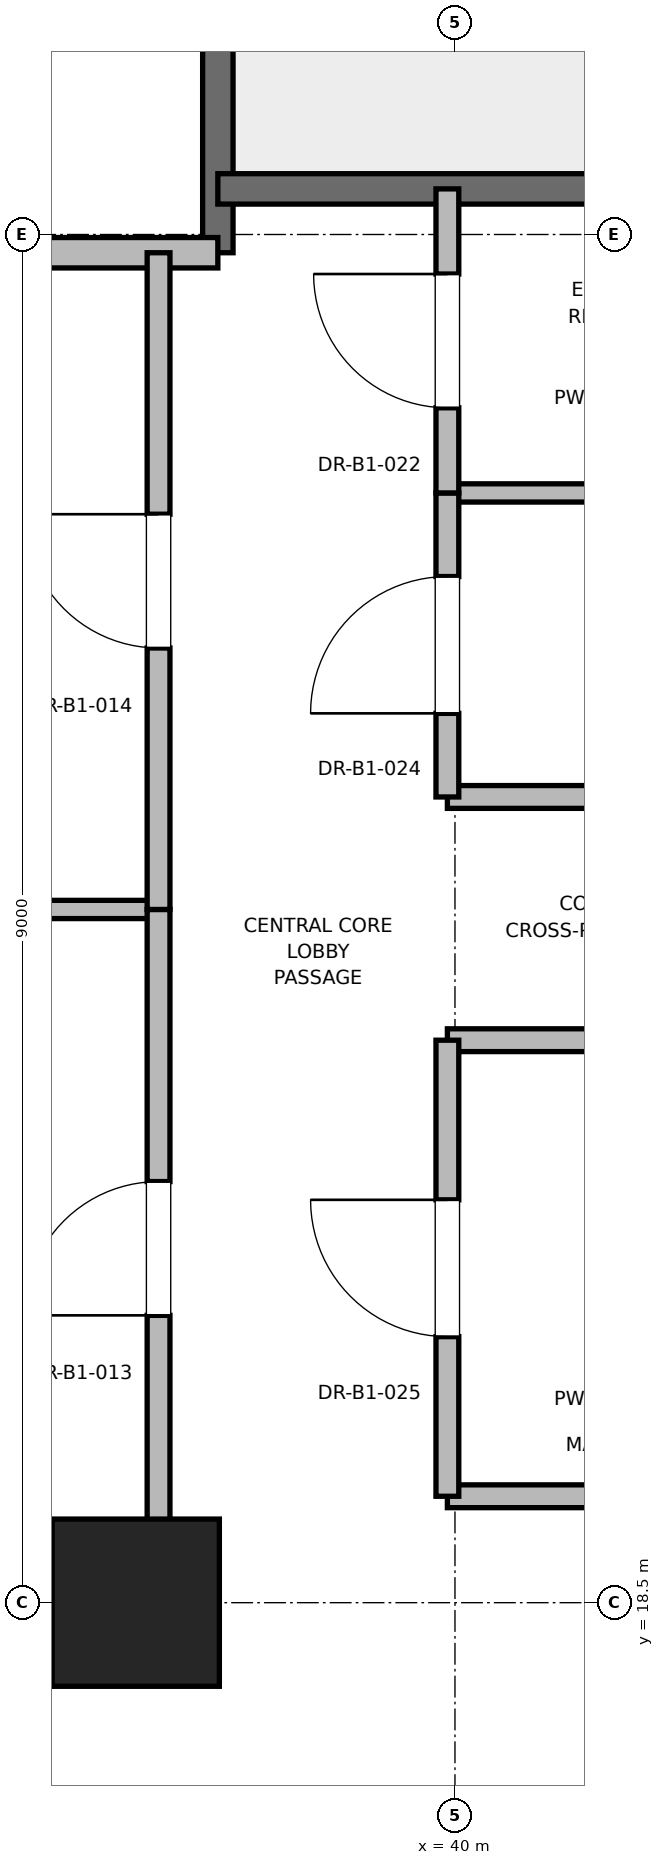
"""IFC4 building model, lengths in metres.
Left out: names, types, materials, properties, quantities, classifications, styles, units other than length and angle.
Written with IfcOpenShell. Run it as: python <this file> out.ifc"""

import sys

from ifc_helpers import new_model, si_unit, direction, frame, frame_2d, origin, origin_2d, place, context, subcontext, project, spatial, rectangle, extrude, element, fill, save


model = new_model("IFC4")
c1 = context("Model", 3, precision=1e-05, world=origin(), true_north=direction((0.0, 1.0)))
c2 = subcontext(c1, "Body", "Model", "MODEL_VIEW")
j1 = project(units=[si_unit("LENGTHUNIT", "METRE"), si_unit("PLANEANGLEUNIT", "RADIAN")], contexts=[c1])
p1 = place(None, origin())
s1 = spatial("IfcSite", under=j1, at=p1, CompositionType="ELEMENT")
p2 = place(p1, origin())
s2 = spatial("IfcBuilding", under=s1, at=p2, CompositionType="ELEMENT")
p3 = place(p2, frame((0.0, 0.0, -4.5)))
s3 = spatial("IfcBuildingStorey", under=s2, at=p3, CompositionType="ELEMENT", Elevation=-4.5)
p4 = place(p3, frame((37.9, 18.5, 0.0), z_axis=(0.0, 0.0, 1.0), x_axis=(1.0, 0.0, 0.0)))
e1 = element("IfcColumn", 1, at=p4, inside=s3, PredefinedType="PILASTER", context=c2, shape_type="SweptSolid", body=[
    extrude(rectangle(XDim=1.1, YDim=1.1, at=origin_2d()), origin(), (0.0, 0.0, 1.0), 4.5),
])
p5 = place(p3, frame((29.0, 18.5, 0.0), z_axis=(0.0, 0.0, 1.0), x_axis=(1.0, 0.0, 0.0)))
e2 = element("IfcWall", 2, at=p5, inside=s3, PredefinedType="SHEAR", context=c2, shape_type="SweptSolid", body=[
    extrude(rectangle(XDim=9.2, YDim=0.65, at=frame_2d((4.6, 0.0))), origin(), (0.0, 0.0, 1.0), 4.22),
])
p6 = place(p3, frame((38.44, 27.38, 0.0), z_axis=(0.0, 0.0, 1.0), x_axis=(0.0, 1.0, 0.0)))
e3 = element("IfcWall", 3, at=p6, inside=s3, PredefinedType="SOLIDWALL", context=c2, shape_type="SweptSolid", body=[
    extrude(rectangle(XDim=8.87, YDim=0.2, at=frame_2d((4.435, 0.0))), origin(), (0.0, 0.0, 1.0), 4.22),
])
p7 = place(p3, frame((38.44, 27.8, 0.0), z_axis=(0.0, 0.0, 1.0), x_axis=(1.0, 0.0, 0.0)))
e4 = element("IfcWall", 4, at=p7, inside=s3, PredefinedType="SOLIDWALL", context=c2, shape_type="SweptSolid", body=[
    extrude(rectangle(XDim=3.32, YDim=0.2, at=frame_2d((1.66, 0.0))), origin(), (0.0, 0.0, 1.0), 4.22),
])
p8 = place(p3, frame((32.82, 27.38, 0.0), z_axis=(0.0, 0.0, 1.0), x_axis=(1.0, 0.0, 0.0)))
e5 = element("IfcWall", 5, at=p8, inside=s3, PredefinedType="PARTITIONING", context=c2, shape_type="SweptSolid", body=[
    extrude(rectangle(XDim=5.62, YDim=0.2, at=frame_2d((2.81, 0.0))), origin(), (0.0, 0.0, 1.0), 4.22),
])
for number, where, z_axis, x_axis in (
    (6, (39.95, 19.2, 0.0), (0.0, 0.0, 1.0), (1.0, 0.0, 0.0)),
    (7, (39.95, 22.2, 0.0), (0.0, 0.0, 1.0), (1.0, 0.0, 0.0)),
    (8, (39.95, 23.8, 0.0), (0.0, 0.0, 1.0), (1.0, 0.0, 0.0)),
):
    element("IfcWall", number, at=place(p3, frame(where, z_axis=z_axis, x_axis=x_axis)), inside=s3, PredefinedType="PARTITIONING", context=c2, shape_type="SweptSolid", body=[
        extrude(rectangle(XDim=1.81, YDim=0.15, at=frame_2d((0.905, 0.0))), origin(), (0.0, 0.0, 1.0), 2.85),
    ])
p9 = place(p3, frame((39.95, 25.8, 0.0), z_axis=(0.0, 0.0, 1.0), x_axis=(1.0, 0.0, 0.0)))
e9 = element("IfcWall", 9, at=p9, inside=s3, PredefinedType="PARTITIONING", context=c2, shape_type="SweptSolid", body=[
    extrude(rectangle(XDim=1.81, YDim=0.12, at=frame_2d((0.905, 0.0))), origin(), (0.0, 0.0, 1.0), 2.85),
])
p10 = place(p3, frame((39.95, 19.2, 0.0), z_axis=(0.0, 0.0, 1.0), x_axis=(0.0, 1.0, 0.0)))
e10 = element("IfcWall", 10, at=p10, inside=s3, PredefinedType="PARTITIONING", context=c2, shape_type="SweptSolid", body=[
    extrude(rectangle(XDim=3.0, YDim=0.15, at=frame_2d((1.5, 0.0))), origin(), (0.0, 0.0, 1.0), 2.85),
])
p11 = place(p10, frame((1.05, 0.0, 0.0)))
e11 = element("IfcOpeningElement", 11, at=p11, cuts=e10, PredefinedType="OPENING", context=c2, shape_type="SweptSolid", body=[
    extrude(rectangle(XDim=0.9, YDim=2.1, at=frame_2d((0.45, 1.05))), frame((0.0, 0.075, 0.0), z_axis=(0.0, -1.0, 0.0), x_axis=(1.0, 0.0, 0.0)), (0.0, 0.0, 1.0), 0.15),
])
p12 = place(p3, frame((39.95, 23.8, 0.0), z_axis=(0.0, 0.0, 1.0), x_axis=(0.0, 1.0, 0.0)))
e12 = element("IfcWall", 12, at=p12, inside=s3, PredefinedType="PARTITIONING", context=c2, shape_type="SweptSolid", body=[
    extrude(rectangle(XDim=2.0, YDim=0.15, at=frame_2d((1.0, 0.0))), origin(), (0.0, 0.0, 1.0), 2.85),
])
p13 = place(p12, frame((0.55, 0.0, 0.0)))
e13 = element("IfcOpeningElement", 13, at=p13, cuts=e12, PredefinedType="OPENING", context=c2, shape_type="SweptSolid", body=[
    extrude(rectangle(XDim=0.9, YDim=2.1, at=frame_2d((0.45, 1.05))), frame((0.0, 0.075, 0.0), z_axis=(0.0, -1.0, 0.0), x_axis=(1.0, 0.0, 0.0)), (0.0, 0.0, 1.0), 0.15),
])
p14 = place(p3, frame((39.95, 25.8, 0.0), z_axis=(0.0, 0.0, 1.0), x_axis=(0.0, 1.0, 0.0)))
e14 = element("IfcWall", 14, at=p14, inside=s3, PredefinedType="PARTITIONING", context=c2, shape_type="SweptSolid", body=[
    extrude(rectangle(XDim=2.0, YDim=0.15, at=frame_2d((1.0, 0.0))), origin(), (0.0, 0.0, 1.0), 2.85),
])
p15 = place(p14, frame((0.56, 0.0, 0.0)))
e15 = element("IfcOpeningElement", 15, at=p15, cuts=e14, PredefinedType="OPENING", context=c2, shape_type="SweptSolid", body=[
    extrude(rectangle(XDim=0.88, YDim=2.1, at=frame_2d((0.44, 1.05))), frame((0.0, 0.075, 0.0), z_axis=(0.0, -1.0, 0.0), x_axis=(1.0, 0.0, 0.0)), (0.0, 0.0, 1.0), 0.15),
])
p16 = place(p3, frame((32.82, 23.06, 0.0), z_axis=(0.0, 0.0, 1.0), x_axis=(1.0, 0.0, 0.0)))
e16 = element("IfcWall", 16, at=p16, inside=s3, PredefinedType="PARTITIONING", context=c2, shape_type="SweptSolid", body=[
    extrude(rectangle(XDim=5.23, YDim=0.12, at=frame_2d((2.615, 0.0))), origin(), (0.0, 0.0, 1.0), 2.85),
])
p17 = place(p3, frame((38.05, 18.6, 0.0), z_axis=(0.0, 0.0, 1.0), x_axis=(0.0, 1.0, 0.0)))
e17 = element("IfcWall", 17, at=p17, inside=s3, PredefinedType="PARTITIONING", context=c2, shape_type="SweptSolid", body=[
    extrude(rectangle(XDim=4.46, YDim=0.15, at=frame_2d((2.23, 0.0))), origin(), (0.0, 0.0, 1.0), 2.85),
])
p18 = place(p17, frame((1.79, 0.0, 0.0)))
e18 = element("IfcOpeningElement", 18, at=p18, cuts=e17, PredefinedType="OPENING", context=c2, shape_type="SweptSolid", body=[
    extrude(rectangle(XDim=0.88, YDim=2.1, at=frame_2d((0.44, 1.05))), frame((0.0, 0.075, 0.0), z_axis=(0.0, -1.0, 0.0), x_axis=(1.0, 0.0, 0.0)), (0.0, 0.0, 1.0), 0.15),
])
p19 = place(p3, frame((38.05, 23.06, 0.0), z_axis=(0.0, 0.0, 1.0), x_axis=(0.0, 1.0, 0.0)))
e19 = element("IfcWall", 19, at=p19, inside=s3, PredefinedType="PARTITIONING", context=c2, shape_type="SweptSolid", body=[
    extrude(rectangle(XDim=4.32, YDim=0.15, at=frame_2d((2.16, 0.0))), origin(), (0.0, 0.0, 1.0), 2.85),
])
p20 = place(p19, frame((1.72, 0.0, 0.0)))
e20 = element("IfcOpeningElement", 20, at=p20, cuts=e19, PredefinedType="OPENING", context=c2, shape_type="SweptSolid", body=[
    extrude(rectangle(XDim=0.88, YDim=2.1, at=frame_2d((0.44, 1.05))), frame((0.0, 0.075, 0.0), z_axis=(0.0, -1.0, 0.0), x_axis=(1.0, 0.0, 0.0)), (0.0, 0.0, 1.0), 0.15),
])
p21 = place(p11, origin())
e21 = element("IfcDoor", 21, at=p21, inside=s3, OperationType="SINGLE_SWING_RIGHT", PredefinedType="DOOR", context=c2, shape_type="SweptSolid", body=[
    extrude(rectangle(XDim=0.9, YDim=2.1, at=frame_2d((0.45, 1.05))), frame((0.0, 0.025, 0.0), z_axis=(0.0, -1.0, 0.0), x_axis=(1.0, 0.0, 0.0)), (0.0, 0.0, 1.0), 0.05),
])
fill(e11, e21)
p22 = place(p13, origin())
e22 = element("IfcDoor", 22, at=p22, inside=s3, OperationType="SINGLE_SWING_LEFT", PredefinedType="DOOR", context=c2, shape_type="SweptSolid", body=[
    extrude(rectangle(XDim=0.9, YDim=2.1, at=frame_2d((0.45, 1.05))), frame((0.0, 0.025, 0.0), z_axis=(0.0, -1.0, 0.0), x_axis=(1.0, 0.0, 0.0)), (0.0, 0.0, 1.0), 0.05),
])
fill(e13, e22)
p23 = place(p15, origin())
e23 = element("IfcDoor", 23, at=p23, inside=s3, OperationType="SINGLE_SWING_RIGHT", PredefinedType="DOOR", context=c2, shape_type="SweptSolid", body=[
    extrude(rectangle(XDim=0.88, YDim=2.1, at=frame_2d((0.44, 1.05))), frame((0.0, 0.025, 0.0), z_axis=(0.0, -1.0, 0.0), x_axis=(1.0, 0.0, 0.0)), (0.0, 0.0, 1.0), 0.05),
])
fill(e15, e23)
p24 = place(p18, origin())
e24 = element("IfcDoor", 24, at=p24, inside=s3, OperationType="SINGLE_SWING_LEFT", PredefinedType="DOOR", context=c2, shape_type="SweptSolid", body=[
    extrude(rectangle(XDim=0.88, YDim=2.1, at=frame_2d((0.44, 1.05))), frame((0.0, 0.025, 0.0), z_axis=(0.0, -1.0, 0.0), x_axis=(1.0, 0.0, 0.0)), (0.0, 0.0, 1.0), 0.05),
])
fill(e18, e24)
p25 = place(p20, origin())
e25 = element("IfcDoor", 25, at=p25, inside=s3, OperationType="SINGLE_SWING_RIGHT", PredefinedType="DOOR", context=c2, shape_type="SweptSolid", body=[
    extrude(rectangle(XDim=0.88, YDim=2.1, at=frame_2d((0.44, 1.05))), frame((0.0, 0.025, 0.0), z_axis=(0.0, -1.0, 0.0), x_axis=(1.0, 0.0, 0.0)), (0.0, 0.0, 1.0), 0.05),
])
fill(e20, e25)
save(model, sys.argv[1])
